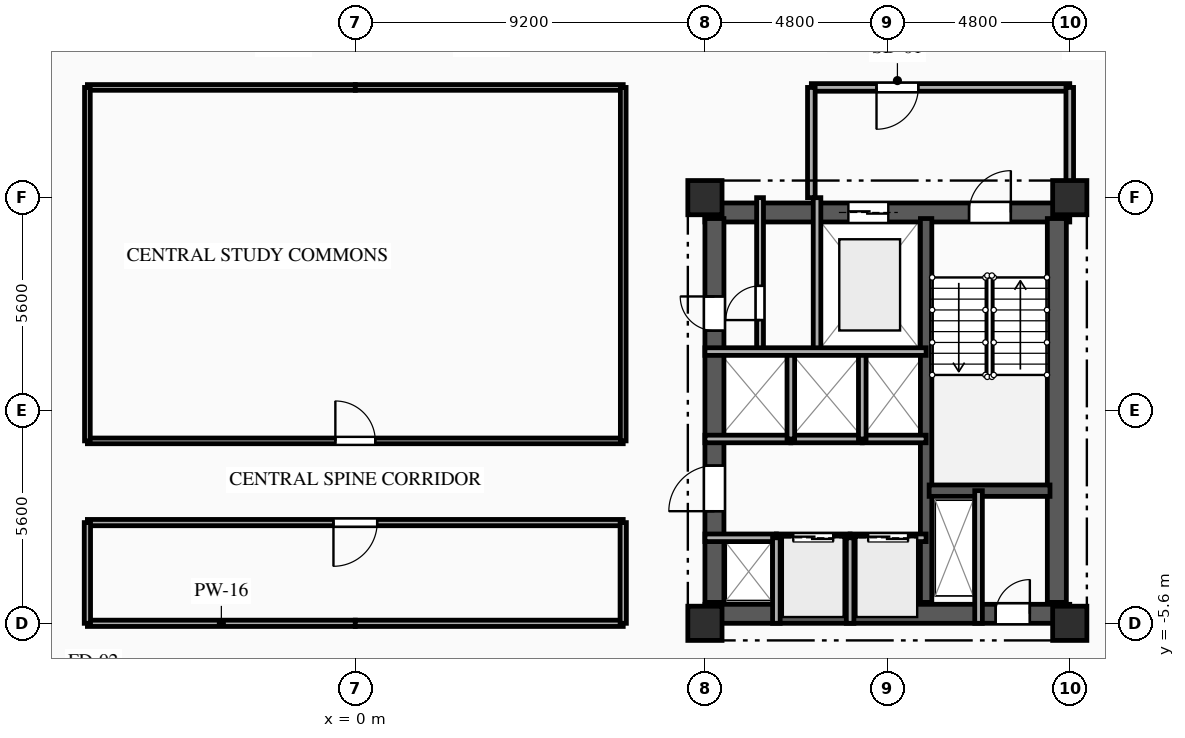
"""IFC4 building model, lengths in metres.
Left out: names, types, materials, properties, quantities, classifications, styles, units other than length and angle.
Written with IfcOpenShell. Run it as: python <this file> out.ifc"""

import sys

from ifc_helpers import new_model, si_unit, direction, frame, frame_2d, origin, origin_2d, place, context, subcontext, project, spatial, rectangle, extrude, element, fill, save


model = new_model("IFC4")
c1 = context("Model", 3, precision=1e-05, world=origin(), true_north=direction((0.0, 1.0)))
c2 = subcontext(c1, "Body", "Model", "MODEL_VIEW")
j1 = project(units=[si_unit("LENGTHUNIT", "METRE"), si_unit("PLANEANGLEUNIT", "RADIAN")], contexts=[c1])
p1 = place(None, origin())
s1 = spatial("IfcSite", under=j1, at=p1, CompositionType="ELEMENT")
p2 = place(p1, origin())
s2 = spatial("IfcBuilding", under=s1, at=p2, CompositionType="ELEMENT")
p3 = place(p2, frame((0.0, 0.0, 157.8)))
s3 = spatial("IfcBuildingStorey", under=s2, at=p3, CompositionType="ELEMENT", Elevation=157.8)
for number, where, z_axis, x_axis in (
    (1, (9.2, -5.6, 0.0), (0.0, 0.0, 1.0), (1.0, 0.0, 0.0)),
    (2, (9.2, 5.6, 0.0), (0.0, 0.0, 1.0), (1.0, 0.0, 0.0)),
    (3, (18.8, -5.6, 0.0), (0.0, 0.0, 1.0), (1.0, 0.0, 0.0)),
    (4, (18.8, 5.6, 0.0), (0.0, 0.0, 1.0), (1.0, 0.0, 0.0)),
):
    element("IfcColumn", number, at=place(p3, frame(where, z_axis=z_axis, x_axis=x_axis)), inside=s3, PredefinedType="COLUMN", context=c2, shape_type="SweptSolid", body=[
        extrude(rectangle(XDim=0.9, YDim=0.9, at=origin_2d()), origin(), (0.0, 0.0, 1.0), 3.35),
    ])
p4 = place(p3, frame((9.2, 5.21, 0.0), z_axis=(0.0, 0.0, 1.0), x_axis=(1.0, 0.0, 0.0)))
e5 = element("IfcWall", 5, at=p4, inside=s3, PredefinedType="SHEAR", context=c2, shape_type="SweptSolid", body=[
    extrude(rectangle(XDim=9.6, YDim=0.5, at=frame_2d((4.8, 0.0))), origin(), (0.0, 0.0, 1.0), 3.04),
])
p5 = place(p4, frame((6.95, 0.0, 0.0)))
e6 = element("IfcOpeningElement", 6, at=p5, cuts=e5, PredefinedType="OPENING", context=c2, shape_type="SweptSolid", body=[
    extrude(rectangle(XDim=1.1, YDim=2.15, at=frame_2d((0.55, 1.075))), frame((0.0, 0.26, 0.0), z_axis=(0.0, -1.0, 0.0), x_axis=(1.0, 0.0, 0.0)), (0.0, 0.0, 1.0), 0.52),
])
p6 = place(p4, frame((3.775, 0.0, 0.0)))
e7 = element("IfcOpeningElement", 7, at=p6, cuts=e5, PredefinedType="OPENING", context=c2, shape_type="SweptSolid", body=[
    extrude(rectangle(XDim=1.05, YDim=2.1, at=frame_2d((0.525, 1.05))), frame((0.0, 0.26, 0.0), z_axis=(0.0, -1.0, 0.0), x_axis=(1.0, 0.0, 0.0)), (0.0, 0.0, 1.0), 0.52),
])
p7 = place(p3, frame((9.2, -5.35, 0.0), z_axis=(0.0, 0.0, 1.0), x_axis=(1.0, 0.0, 0.0)))
e8 = element("IfcWall", 8, at=p7, inside=s3, PredefinedType="SHEAR", context=c2, shape_type="SweptSolid", body=[
    extrude(rectangle(XDim=9.6, YDim=0.5, at=frame_2d((4.8, 0.0))), origin(), (0.0, 0.0, 1.0), 3.04),
])
p8 = place(p7, frame((7.65, 0.0, 0.0)))
e9 = element("IfcOpeningElement", 9, at=p8, cuts=e8, PredefinedType="OPENING", context=c2, shape_type="SweptSolid", body=[
    extrude(rectangle(XDim=0.9, YDim=2.1, at=frame_2d((0.45, 1.05))), frame((0.0, 0.26, 0.0), z_axis=(0.0, -1.0, 0.0), x_axis=(1.0, 0.0, 0.0)), (0.0, 0.0, 1.0), 0.52),
])
p9 = place(p3, frame((9.45, -5.05, 0.0), z_axis=(0.0, 0.0, 1.0), x_axis=(0.0, 1.0, 0.0)))
e10 = element("IfcWall", 10, at=p9, inside=s3, PredefinedType="SHEAR", context=c2, shape_type="SweptSolid", body=[
    extrude(rectangle(XDim=10.1, YDim=0.5, at=frame_2d((5.05, 0.0))), origin(), (0.0, 0.0, 1.0), 3.04),
])
p10 = place(p9, frame((7.15, 0.0, 0.0)))
e11 = element("IfcOpeningElement", 11, at=p10, cuts=e10, PredefinedType="OPENING", context=c2, shape_type="SweptSolid", body=[
    extrude(rectangle(XDim=0.9, YDim=2.1, at=frame_2d((0.45, 1.05))), frame((0.0, 0.26, 0.0), z_axis=(0.0, -1.0, 0.0), x_axis=(1.0, 0.0, 0.0)), (0.0, 0.0, 1.0), 0.52),
])
p11 = place(p9, frame((2.4, 0.0, 0.0)))
e12 = element("IfcOpeningElement", 12, at=p11, cuts=e10, PredefinedType="OPENING", context=c2, shape_type="SweptSolid", body=[
    extrude(rectangle(XDim=1.2, YDim=2.15, at=frame_2d((0.6, 1.075))), frame((0.0, 0.26, 0.0), z_axis=(0.0, -1.0, 0.0), x_axis=(1.0, 0.0, 0.0)), (0.0, 0.0, 1.0), 0.52),
])
p12 = place(p3, frame((18.46, -5.05, 0.0), z_axis=(0.0, 0.0, 1.0), x_axis=(0.0, 1.0, 0.0)))
e13 = element("IfcWall", 13, at=p12, inside=s3, PredefinedType="SHEAR", context=c2, shape_type="SweptSolid", body=[
    extrude(rectangle(XDim=10.1, YDim=0.5, at=frame_2d((5.05, 0.0))), origin(), (0.0, 0.0, 1.0), 3.04),
])
p13 = place(p3, frame((15.02, -5.05, 0.0), z_axis=(0.0, 0.0, 1.0), x_axis=(0.0, 1.0, 0.0)))
e14 = element("IfcWall", 14, at=p13, inside=s3, PredefinedType="SHEAR", context=c2, shape_type="SweptSolid", body=[
    extrude(rectangle(XDim=10.1, YDim=0.3, at=frame_2d((5.05, 0.0))), origin(), (0.0, 0.0, 1.0), 3.04),
])
p14 = place(p3, frame((15.1, -2.11, 0.0), z_axis=(0.0, 0.0, 1.0), x_axis=(1.0, 0.0, 0.0)))
e15 = element("IfcWall", 15, at=p14, inside=s3, PredefinedType="SHEAR", context=c2, shape_type="SweptSolid", body=[
    extrude(rectangle(XDim=3.18, YDim=0.3, at=frame_2d((1.59, 0.0))), origin(), (0.0, 0.0, 1.0), 3.04),
])
p15 = place(p3, frame((16.4, -2.11, 0.0), z_axis=(0.0, 0.0, 1.0), x_axis=(0.0, -1.0, 0.0)))
e16 = element("IfcWall", 16, at=p15, inside=s3, PredefinedType="PARTITIONING", context=c2, shape_type="SweptSolid", body=[
    extrude(rectangle(XDim=3.49, YDim=0.2, at=frame_2d((1.745, 0.0))), origin(), (0.0, 0.0, 1.0), 3.04),
])
p16 = place(p3, frame((12.15, 5.6, 0.0), z_axis=(0.0, 0.0, 1.0), x_axis=(0.0, -1.0, 0.0)))
e17 = element("IfcWall", 17, at=p16, inside=s3, PredefinedType="PARTITIONING", context=c2, shape_type="SweptSolid", body=[
    extrude(rectangle(XDim=4.05, YDim=0.2, at=frame_2d((2.025, 0.0))), origin(), (0.0, 0.0, 1.0), 3.04),
])
p17 = place(p3, frame((18.8, 8.5, 0.0), z_axis=(0.0, 0.0, 1.0), x_axis=(-1.0, 0.0, 0.0)))
e18 = element("IfcWall", 18, at=p17, inside=s3, PredefinedType="PARTITIONING", context=c2, shape_type="SweptSolid", body=[
    extrude(rectangle(XDim=6.8, YDim=0.2, at=frame_2d((3.4, 0.0))), origin(), (0.0, 0.0, 1.0), 3.04),
])
p18 = place(p17, frame((3.985, 0.0, 0.0)))
e19 = element("IfcOpeningElement", 19, at=p18, cuts=e18, PredefinedType="OPENING", context=c2, shape_type="SweptSolid", body=[
    extrude(rectangle(XDim=1.1, YDim=2.15, at=frame_2d((0.55, 1.075))), frame((0.0, 0.11, 0.0), z_axis=(0.0, -1.0, 0.0), x_axis=(1.0, 0.0, 0.0)), (0.0, 0.0, 1.0), 0.22),
])
p19 = place(p3, frame((18.8, 5.6, 0.0), z_axis=(0.0, 0.0, 1.0), x_axis=(0.0, 1.0, 0.0)))
e20 = element("IfcWall", 20, at=p19, inside=s3, PredefinedType="PARTITIONING", context=c2, shape_type="SweptSolid", body=[
    extrude(rectangle(XDim=2.9, YDim=0.2, at=frame_2d((1.45, 0.0))), origin(), (0.0, 0.0, 1.0), 2.525),
])
p20 = place(p3, frame((12.0, 8.5, 0.0), z_axis=(0.0, 0.0, 1.0), x_axis=(0.0, -1.0, 0.0)))
e21 = element("IfcWall", 21, at=p20, inside=s3, PredefinedType="PARTITIONING", context=c2, shape_type="SweptSolid", body=[
    extrude(rectangle(XDim=2.9, YDim=0.2, at=frame_2d((1.45, 0.0))), origin(), (0.0, 0.0, 1.0), 3.04),
])
p21 = place(p3, frame((10.65, 1.55, 0.0), z_axis=(0.0, 0.0, 1.0), x_axis=(0.0, 1.0, 0.0)))
e22 = element("IfcWall", 22, at=p21, inside=s3, PredefinedType="PARTITIONING", context=c2, shape_type="SweptSolid", body=[
    extrude(rectangle(XDim=4.05, YDim=0.18, at=frame_2d((2.025, 0.0))), origin(), (0.0, 0.0, 1.0), 3.04),
])
p22 = place(p21, frame((0.829, 0.0, 0.0)))
e23 = element("IfcOpeningElement", 23, at=p22, cuts=e22, PredefinedType="OPENING", context=c2, shape_type="SweptSolid", body=[
    extrude(rectangle(XDim=0.9, YDim=2.1, at=frame_2d((0.45, 1.05))), frame((0.0, 0.1, 0.0), z_axis=(0.0, -1.0, 0.0), x_axis=(1.0, 0.0, 0.0)), (0.0, 0.0, 1.0), 0.2),
])
p23 = place(p3, frame((9.2, -3.35, 0.0), z_axis=(0.0, 0.0, 1.0), x_axis=(1.0, 0.0, 0.0)))
e24 = element("IfcWall", 24, at=p23, inside=s3, PredefinedType="PARTITIONING", context=c2, shape_type="SweptSolid", body=[
    extrude(rectangle(XDim=1.88, YDim=0.2, at=frame_2d((0.94, 0.0))), origin(), (0.0, 0.0, 1.0), 2.755),
])
p24 = place(p3, frame((11.08, -3.35, 0.0), z_axis=(0.0, 0.0, 1.0), x_axis=(1.0, 0.0, 0.0)))
e25 = element("IfcWall", 25, at=p24, inside=s3, PredefinedType="PARTITIONING", context=c2, shape_type="SweptSolid", body=[
    extrude(rectangle(XDim=1.94, YDim=0.2, at=frame_2d((0.97, 0.0))), origin(), (0.0, 0.0, 1.0), 3.04),
])
p25 = place(p24, frame((0.445, 0.0, 0.0)))
e26 = element("IfcOpeningElement", 26, at=p25, cuts=e25, PredefinedType="OPENING", context=c2, shape_type="SweptSolid", body=[
    extrude(rectangle(XDim=1.05, YDim=2.1, at=frame_2d((0.525, 1.05))), frame((0.0, 0.11, 0.0), z_axis=(0.0, -1.0, 0.0), x_axis=(1.0, 0.0, 0.0)), (0.0, 0.0, 1.0), 0.22),
])
p26 = place(p3, frame((13.02, -3.35, 0.0), z_axis=(0.0, 0.0, 1.0), x_axis=(1.0, 0.0, 0.0)))
e27 = element("IfcWall", 27, at=p26, inside=s3, PredefinedType="PARTITIONING", context=c2, shape_type="SweptSolid", body=[
    extrude(rectangle(XDim=2.0, YDim=0.2, at=frame_2d((1.0, 0.0))), origin(), (0.0, 0.0, 1.0), 3.04),
])
p27 = place(p26, frame((0.475, 0.0, 0.0)))
e28 = element("IfcOpeningElement", 28, at=p27, cuts=e27, PredefinedType="OPENING", context=c2, shape_type="SweptSolid", body=[
    extrude(rectangle(XDim=1.05, YDim=2.1, at=frame_2d((0.525, 1.05))), frame((0.0, 0.11, 0.0), z_axis=(0.0, -1.0, 0.0), x_axis=(1.0, 0.0, 0.0)), (0.0, 0.0, 1.0), 0.22),
])
p28 = place(p3, frame((11.46, -0.75, 0.0), z_axis=(0.0, 0.0, 1.0), x_axis=(-1.0, 0.0, 0.0)))
e29 = element("IfcWall", 29, at=p28, inside=s3, PredefinedType="PARTITIONING", context=c2, shape_type="SweptSolid", body=[
    extrude(rectangle(XDim=2.26, YDim=0.2, at=frame_2d((1.13, 0.0))), origin(), (0.0, 0.0, 1.0), 3.04),
])
p29 = place(p3, frame((13.34, -0.75, 0.0), z_axis=(0.0, 0.0, 1.0), x_axis=(-1.0, 0.0, 0.0)))
e30 = element("IfcWall", 30, at=p29, inside=s3, PredefinedType="PARTITIONING", context=c2, shape_type="SweptSolid", body=[
    extrude(rectangle(XDim=1.88, YDim=0.2, at=frame_2d((0.94, 0.0))), origin(), (0.0, 0.0, 1.0), 3.04),
])
p30 = place(p3, frame((15.02, -0.75, 0.0), z_axis=(0.0, 0.0, 1.0), x_axis=(-1.0, 0.0, 0.0)))
e31 = element("IfcWall", 31, at=p30, inside=s3, PredefinedType="PARTITIONING", context=c2, shape_type="SweptSolid", body=[
    extrude(rectangle(XDim=1.68, YDim=0.2, at=frame_2d((0.84, 0.0))), origin(), (0.0, 0.0, 1.0), 3.04),
])
for number, where, z_axis, x_axis in (
    (32, (11.08, -5.6, 0.0), (0.0, 0.0, 1.0), (0.0, 1.0, 0.0)),
    (33, (13.02, -5.6, 0.0), (0.0, 0.0, 1.0), (0.0, 1.0, 0.0)),
):
    element("IfcWall", number, at=place(p3, frame(where, z_axis=z_axis, x_axis=x_axis)), inside=s3, PredefinedType="PARTITIONING", context=c2, shape_type="SweptSolid", body=[
        extrude(rectangle(XDim=2.25, YDim=0.2, at=frame_2d((1.125, 0.0))), origin(), (0.0, 0.0, 1.0), 3.04),
    ])
for number, where, z_axis, x_axis in (
    (34, (11.46, -0.75, 0.0), (0.0, 0.0, 1.0), (0.0, 1.0, 0.0)),
    (35, (13.34, -0.75, 0.0), (0.0, 0.0, 1.0), (0.0, 1.0, 0.0)),
):
    element("IfcWall", number, at=place(p3, frame(where, z_axis=z_axis, x_axis=x_axis)), inside=s3, PredefinedType="PARTITIONING", context=c2, shape_type="SweptSolid", body=[
        extrude(rectangle(XDim=2.3, YDim=0.2, at=frame_2d((1.15, 0.0))), origin(), (0.0, 0.0, 1.0), 3.04),
    ])
for number, where, z_axis, x_axis in (
    (36, (0.0, 8.5, 0.0), (0.0, 0.0, 1.0), (-1.0, 0.0, 0.0)),
    (37, (7.05, 8.5, 0.0), (0.0, 0.0, 1.0), (-1.0, 0.0, 0.0)),
):
    element("IfcWall", number, at=place(p3, frame(where, z_axis=z_axis, x_axis=x_axis)), inside=s3, PredefinedType="PARTITIONING", context=c2, shape_type="SweptSolid", body=[
        extrude(rectangle(XDim=7.05, YDim=0.15, at=frame_2d((3.525, 0.0))), origin(), (0.0, 0.0, 1.0), 3.04),
    ])
for number, where, z_axis, x_axis in (
    (38, (-7.05, -5.6, 0.0), (0.0, 0.0, 1.0), (1.0, 0.0, 0.0)),
    (39, (0.0, -5.6, 0.0), (0.0, 0.0, 1.0), (1.0, 0.0, 0.0)),
):
    element("IfcWall", number, at=place(p3, frame(where, z_axis=z_axis, x_axis=x_axis)), inside=s3, PredefinedType="PARTITIONING", context=c2, shape_type="SweptSolid", body=[
        extrude(rectangle(XDim=7.05, YDim=0.165, at=frame_2d((3.525, 0.0))), origin(), (0.0, 0.0, 1.0), 2.525),
    ])
p31 = place(p3, frame((-7.05, -0.8, 0.0), z_axis=(0.0, 0.0, 1.0), x_axis=(1.0, 0.0, 0.0)))
e40 = element("IfcWall", 40, at=p31, inside=s3, PredefinedType="PARTITIONING", context=c2, shape_type="SweptSolid", body=[
    extrude(rectangle(XDim=14.1, YDim=0.15, at=frame_2d((7.05, 0.0))), origin(), (0.0, 0.0, 1.0), 3.04),
])
p32 = place(p31, frame((6.525, 0.0, 0.0)))
e41 = element("IfcOpeningElement", 41, at=p32, cuts=e40, PredefinedType="OPENING", context=c2, shape_type="SweptSolid", body=[
    extrude(rectangle(XDim=1.05, YDim=2.15, at=frame_2d((0.525, 1.075))), frame((0.0, 0.085, 0.0), z_axis=(0.0, -1.0, 0.0), x_axis=(1.0, 0.0, 0.0)), (0.0, 0.0, 1.0), 0.17),
])
p33 = place(p3, frame((7.05, -2.95, 0.0), z_axis=(0.0, 0.0, 1.0), x_axis=(-1.0, 0.0, 0.0)))
e42 = element("IfcWall", 42, at=p33, inside=s3, PredefinedType="PARTITIONING", context=c2, shape_type="SweptSolid", body=[
    extrude(rectangle(XDim=14.1, YDim=0.165, at=frame_2d((7.05, 0.0))), origin(), (0.0, 0.0, 1.0), 3.04),
])
p34 = place(p33, frame((6.475, 0.0, 0.0)))
e43 = element("IfcOpeningElement", 43, at=p34, cuts=e42, PredefinedType="OPENING", context=c2, shape_type="SweptSolid", body=[
    extrude(rectangle(XDim=1.15, YDim=2.15, at=frame_2d((0.575, 1.075))), frame((0.0, 0.093, 0.0), z_axis=(0.0, -1.0, 0.0), x_axis=(1.0, 0.0, 0.0)), (0.0, 0.0, 1.0), 0.185),
])
p35 = place(p3, frame((-7.05, 8.5, 0.0), z_axis=(0.0, 0.0, 1.0), x_axis=(0.0, -1.0, 0.0)))
e44 = element("IfcWall", 44, at=p35, inside=s3, PredefinedType="PARTITIONING", context=c2, shape_type="SweptSolid", body=[
    extrude(rectangle(XDim=9.3, YDim=0.15, at=frame_2d((4.65, 0.0))), origin(), (0.0, 0.0, 1.0), 3.04),
])
p36 = place(p3, frame((-7.05, -2.95, 0.0), z_axis=(0.0, 0.0, 1.0), x_axis=(0.0, -1.0, 0.0)))
e45 = element("IfcWall", 45, at=p36, inside=s3, PredefinedType="PARTITIONING", context=c2, shape_type="SweptSolid", body=[
    extrude(rectangle(XDim=2.65, YDim=0.165, at=frame_2d((1.325, 0.0))), origin(), (0.0, 0.0, 1.0), 3.04),
])
p37 = place(p3, frame((7.05, -0.8, 0.0), z_axis=(0.0, 0.0, 1.0), x_axis=(0.0, 1.0, 0.0)))
e46 = element("IfcWall", 46, at=p37, inside=s3, PredefinedType="PARTITIONING", context=c2, shape_type="SweptSolid", body=[
    extrude(rectangle(XDim=9.3, YDim=0.15, at=frame_2d((4.65, 0.0))), origin(), (0.0, 0.0, 1.0), 3.04),
])
p38 = place(p3, frame((7.05, -5.6, 0.0), z_axis=(0.0, 0.0, 1.0), x_axis=(0.0, 1.0, 0.0)))
e47 = element("IfcWall", 47, at=p38, inside=s3, PredefinedType="PARTITIONING", context=c2, shape_type="SweptSolid", body=[
    extrude(rectangle(XDim=2.65, YDim=0.165, at=frame_2d((1.325, 0.0))), origin(), (0.0, 0.0, 1.0), 3.04),
])
p39 = place(p3, frame((9.2, 1.55, 0.0), z_axis=(0.0, 0.0, 1.0), x_axis=(1.0, 0.0, 0.0)))
e48 = element("IfcWall", 48, at=p39, inside=s3, PredefinedType="PARTITIONING", context=c2, shape_type="SweptSolid", body=[
    extrude(rectangle(XDim=5.82, YDim=0.2, at=frame_2d((2.91, 0.0))), origin(), (0.0, 0.0, 1.0), 3.04),
])
p40 = place(p5, origin())
e49 = element("IfcDoor", 49, at=p40, inside=s3, OperationType="SINGLE_SWING_RIGHT", PredefinedType="DOOR", context=c2, shape_type="SweptSolid", body=[
    extrude(rectangle(XDim=1.1, YDim=2.15, at=frame_2d((0.55, 1.075))), frame((0.0, 0.025, 0.0), z_axis=(0.0, -1.0, 0.0), x_axis=(1.0, 0.0, 0.0)), (0.0, 0.0, 1.0), 0.05),
])
fill(e6, e49)
p41 = place(p6, origin())
e50 = element("IfcDoor", 50, at=p41, inside=s3, OperationType="DOUBLE_DOOR_SLIDING", PredefinedType="DOOR", context=c2, shape_type="SweptSolid", body=[
    extrude(rectangle(XDim=1.05, YDim=2.1, at=frame_2d((0.525, 1.05))), frame((0.0, 0.025, 0.0), z_axis=(0.0, -1.0, 0.0), x_axis=(1.0, 0.0, 0.0)), (0.0, 0.0, 1.0), 0.05),
])
fill(e7, e50)
p42 = place(p8, origin())
e51 = element("IfcDoor", 51, at=p42, inside=s3, OperationType="SINGLE_SWING_RIGHT", PredefinedType="DOOR", context=c2, shape_type="SweptSolid", body=[
    extrude(rectangle(XDim=0.9, YDim=2.1, at=frame_2d((0.45, 1.05))), frame((0.0, 0.025, 0.0), z_axis=(0.0, -1.0, 0.0), x_axis=(1.0, 0.0, 0.0)), (0.0, 0.0, 1.0), 0.05),
])
fill(e9, e51)
p43 = place(p18, origin())
e52 = element("IfcDoor", 52, at=p43, inside=s3, OperationType="SINGLE_SWING_RIGHT", PredefinedType="DOOR", context=c2, shape_type="SweptSolid", body=[
    extrude(rectangle(XDim=1.1, YDim=2.15, at=frame_2d((0.55, 1.075))), frame((0.0, 0.025, 0.0), z_axis=(0.0, -1.0, 0.0), x_axis=(1.0, 0.0, 0.0)), (0.0, 0.0, 1.0), 0.05),
])
fill(e19, e52)
p44 = place(p22, origin())
e53 = element("IfcDoor", 53, at=p44, inside=s3, OperationType="SINGLE_SWING_LEFT", PredefinedType="DOOR", context=c2, shape_type="SweptSolid", body=[
    extrude(rectangle(XDim=0.9, YDim=2.1, at=frame_2d((0.45, 1.05))), frame((0.0, 0.025, 0.0), z_axis=(0.0, -1.0, 0.0), x_axis=(1.0, 0.0, 0.0)), (0.0, 0.0, 1.0), 0.05),
])
fill(e23, e53)
p45 = place(p10, origin())
e54 = element("IfcDoor", 54, at=p45, inside=s3, OperationType="SINGLE_SWING_RIGHT", PredefinedType="DOOR", context=c2, shape_type="SweptSolid", body=[
    extrude(rectangle(XDim=0.9, YDim=2.1, at=frame_2d((0.45, 1.05))), frame((0.0, 0.025, 0.0), z_axis=(0.0, -1.0, 0.0), x_axis=(1.0, 0.0, 0.0)), (0.0, 0.0, 1.0), 0.05),
])
fill(e11, e54)
p46 = place(p25, origin())
e55 = element("IfcDoor", 55, at=p46, inside=s3, OperationType="DOUBLE_DOOR_SLIDING", PredefinedType="DOOR", context=c2, shape_type="SweptSolid", body=[
    extrude(rectangle(XDim=1.05, YDim=2.1, at=frame_2d((0.525, 1.05))), frame((0.0, 0.025, 0.0), z_axis=(0.0, -1.0, 0.0), x_axis=(1.0, 0.0, 0.0)), (0.0, 0.0, 1.0), 0.05),
])
fill(e26, e55)
p47 = place(p27, origin())
e56 = element("IfcDoor", 56, at=p47, inside=s3, OperationType="DOUBLE_DOOR_SLIDING", PredefinedType="DOOR", context=c2, shape_type="SweptSolid", body=[
    extrude(rectangle(XDim=1.05, YDim=2.1, at=frame_2d((0.525, 1.05))), frame((0.0, 0.025, 0.0), z_axis=(0.0, -1.0, 0.0), x_axis=(1.0, 0.0, 0.0)), (0.0, 0.0, 1.0), 0.05),
])
fill(e28, e56)
p48 = place(p11, origin())
e57 = element("IfcDoor", 57, at=p48, inside=s3, OperationType="SINGLE_SWING_LEFT", PredefinedType="DOOR", context=c2, shape_type="SweptSolid", body=[
    extrude(rectangle(XDim=1.2, YDim=2.15, at=frame_2d((0.6, 1.075))), frame((0.0, 0.025, 0.0), z_axis=(0.0, -1.0, 0.0), x_axis=(1.0, 0.0, 0.0)), (0.0, 0.0, 1.0), 0.05),
])
fill(e12, e57)
p49 = place(p32, origin())
e58 = element("IfcDoor", 58, at=p49, inside=s3, OperationType="SINGLE_SWING_LEFT", PredefinedType="DOOR", context=c2, shape_type="SweptSolid", body=[
    extrude(rectangle(XDim=1.05, YDim=2.15, at=frame_2d((0.525, 1.075))), frame((0.0, 0.025, 0.0), z_axis=(0.0, -1.0, 0.0), x_axis=(1.0, 0.0, 0.0)), (0.0, 0.0, 1.0), 0.05),
])
fill(e41, e58)
p50 = place(p34, origin())
e59 = element("IfcDoor", 59, at=p50, inside=s3, OperationType="SINGLE_SWING_RIGHT", PredefinedType="DOOR", context=c2, shape_type="SweptSolid", body=[
    extrude(rectangle(XDim=1.15, YDim=2.15, at=frame_2d((0.575, 1.075))), frame((0.0, 0.025, 0.0), z_axis=(0.0, -1.0, 0.0), x_axis=(1.0, 0.0, 0.0)), (0.0, 0.0, 1.0), 0.05),
])
fill(e43, e59)
save(model, sys.argv[1])
